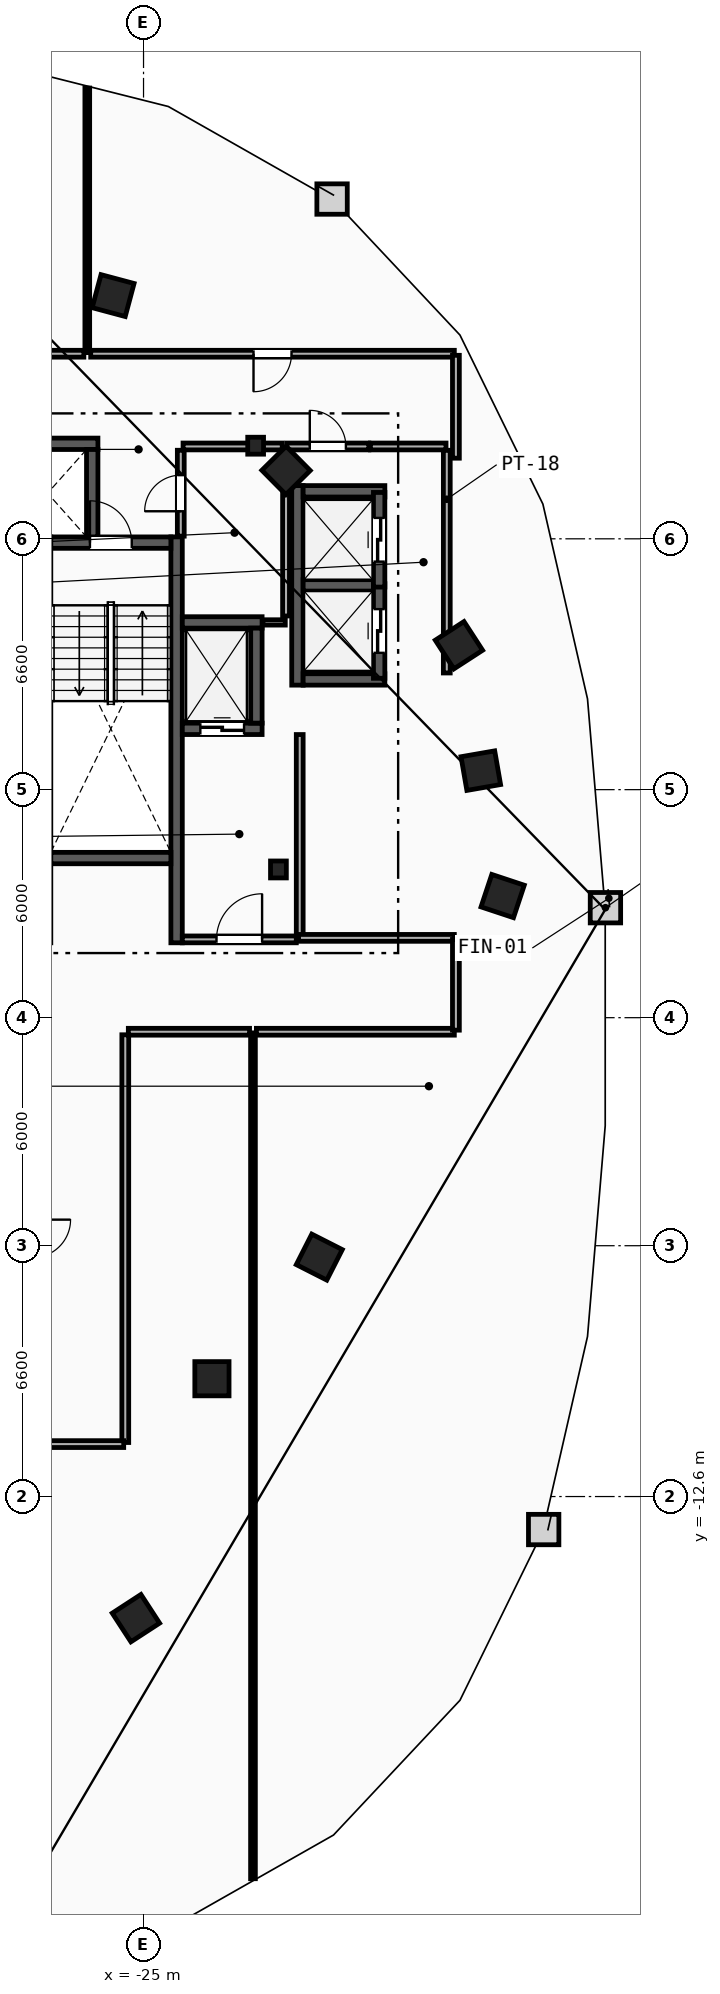
"""IFC4 building model, lengths in metres.
Left out: names, types, materials, properties, quantities, classifications, styles, units other than length and angle.
Written with IfcOpenShell. Run it as: python <this file> out.ifc"""

import sys

from ifc_helpers import new_model, si_unit, direction, frame, frame_2d, origin, origin_2d, place, context, subcontext, project, spatial, rectangle, i_section, extrude, element, fill, save


model = new_model("IFC4")
c1 = context("Model", 3, precision=1e-05, world=origin(), true_north=direction((0.0, 1.0)))
c2 = subcontext(c1, "Body", "Model", "MODEL_VIEW")
j1 = project(units=[si_unit("LENGTHUNIT", "METRE"), si_unit("PLANEANGLEUNIT", "RADIAN")], contexts=[c1])
p1 = place(None, origin())
s1 = spatial("IfcSite", under=j1, at=p1, CompositionType="ELEMENT")
p2 = place(p1, origin())
s2 = spatial("IfcBuilding", under=s1, at=p2, CompositionType="ELEMENT")
p3 = place(p2, frame((0.0, 0.0, 195.4)))
s3 = spatial("IfcBuildingStorey", under=s2, at=p3, CompositionType="ELEMENT", Elevation=195.4)
for number, where, z_axis, x_axis in (
    (1, (-21.45, 3.9, 0.0), (0.0, 0.0, 1.0), (1.0, 0.0, 0.0)),
    (2, (-22.05, 15.05, 0.0), (0.0, 0.0, 1.0), (1.0, 0.0, 0.0)),
):
    element("IfcColumn", number, at=place(p3, frame(where, z_axis=z_axis, x_axis=x_axis)), inside=s3, PredefinedType="COLUMN", context=c2, shape_type="SweptSolid", body=[
        extrude(i_section(OverallWidth=0.416, OverallDepth=0.446, WebThickness=0.039, FlangeThickness=0.063, FilletRadius=0.018, at=origin_2d()), origin(), (0.0, 0.0, 1.0), 3.6),
    ])
for number, where, z_axis, x_axis in (
    (3, (-23.2, -9.5, 0.0), (0.0, 0.0, 1.0), (1.0, 0.0, 0.0)),
    (4, (-15.55, 3.2, 0.0), (0.0, 0.0, 1.0), (0.315, 0.949, 0.0)),
    (5, (-16.125, 6.5, 0.0), (0.0, 0.0, 1.0), (-0.172, 0.985, 0.0)),
    (6, (-16.7, 9.8, 0.0), (0.0, 0.0, 1.0), (-0.544, 0.839, 0.0)),
    (7, (-21.25, 14.4, 0.0), (0.0, 0.0, 1.0), (-0.703, 0.711, 0.0)),
    (8, (-25.8, 19.0, 0.0), (0.0, 0.0, 1.0), (-0.966, 0.259, 0.0)),
    (9, (-25.2, -15.8, 0.0), (0.0, 0.0, 1.0), (0.838, 0.546, 0.0)),
    (10, (-20.375, -6.3, 0.0), (0.0, 0.0, 1.0), (0.453, 0.892, 0.0)),
):
    element("IfcColumn", number, at=place(p3, frame(where, z_axis=z_axis, x_axis=x_axis)), inside=s3, PredefinedType="COLUMN", context=c2, shape_type="SweptSolid", body=[
        extrude(rectangle(XDim=0.9, YDim=0.9, at=origin_2d()), origin(), (0.0, 0.0, 1.0), 3.6),
    ])
p4 = place(p3, frame((-24.13, 1.97, 0.0), z_axis=(0.0, 0.0, 1.0), x_axis=(0.0, 1.0, 0.0)))
e11 = element("IfcWall", 11, at=p4, inside=s3, PredefinedType="SHEAR", context=c2, shape_type="SweptSolid", body=[
    extrude(rectangle(XDim=10.68, YDim=0.3, at=frame_2d((5.34, 0.0))), origin(), (0.0, 0.0, 1.0), 3.34),
])
p5 = place(p3, frame((-27.44, 12.5, 0.0), z_axis=(0.0, 0.0, 1.0), x_axis=(1.0, 0.0, 0.0)))
e12 = element("IfcWall", 12, at=p5, inside=s3, PredefinedType="SHEAR", context=c2, shape_type="SweptSolid", body=[
    extrude(rectangle(XDim=3.16, YDim=0.3, at=frame_2d((1.58, 0.0))), origin(), (0.0, 0.0, 1.0), 3.34),
])
p6 = place(p5, frame((1.03, 0.0, 0.0)))
e13 = element("IfcOpeningElement", 13, at=p6, cuts=e12, PredefinedType="OPENING", context=c2, shape_type="SweptSolid", body=[
    extrude(rectangle(XDim=1.1, YDim=2.15, at=frame_2d((0.55, 1.075))), frame((0.0, 0.16, 0.0), z_axis=(0.0, -1.0, 0.0), x_axis=(1.0, 0.0, 0.0)), (0.0, 0.0, 1.0), 0.32),
])
p7 = place(p3, frame((-27.44, 4.2, 0.0), z_axis=(0.0, 0.0, 1.0), x_axis=(1.0, 0.0, 0.0)))
e14 = element("IfcWall", 14, at=p7, inside=s3, PredefinedType="SHEAR", context=c2, shape_type="SweptSolid", body=[
    extrude(rectangle(XDim=3.16, YDim=0.3, at=frame_2d((1.58, 0.0))), origin(), (0.0, 0.0, 1.0), 3.34),
])
p8 = place(p3, frame((-20.89, 2.15, 0.0), z_axis=(0.0, 0.0, 1.0), x_axis=(0.0, 1.0, 0.0)))
e15 = element("IfcWall", 15, at=p8, inside=s3, PredefinedType="PARTITIONING", context=c2, shape_type="SweptSolid", body=[
    extrude(rectangle(XDim=5.3, YDim=0.18, at=frame_2d((2.65, 0.0))), origin(), (0.0, 0.0, 1.0), 3.34),
])
p9 = place(p3, frame((-23.98, 2.06, 0.0), z_axis=(0.0, 0.0, 1.0), x_axis=(1.0, 0.0, 0.0)))
e16 = element("IfcWall", 16, at=p9, inside=s3, PredefinedType="PARTITIONING", context=c2, shape_type="SweptSolid", body=[
    extrude(rectangle(XDim=3.0, YDim=0.18, at=frame_2d((1.5, 0.0))), origin(), (0.0, 0.0, 1.0), 3.34),
])
p10 = place(p9, frame((0.9, 0.0, 0.0)))
e17 = element("IfcOpeningElement", 17, at=p10, cuts=e16, PredefinedType="OPENING", context=c2, shape_type="SweptSolid", body=[
    extrude(rectangle(XDim=1.2, YDim=2.15, at=frame_2d((0.6, 1.075))), frame((0.0, 0.1, 0.0), z_axis=(0.0, -1.0, 0.0), x_axis=(1.0, 0.0, 0.0)), (0.0, 0.0, 1.0), 0.2),
])
p11 = place(p3, frame((-23.98, 7.6, 0.0), z_axis=(0.0, 0.0, 1.0), x_axis=(1.0, 0.0, 0.0)))
e18 = element("IfcWall", 18, at=p11, inside=s3, PredefinedType="SHEAR", context=c2, shape_type="SweptSolid", body=[
    extrude(rectangle(XDim=2.1, YDim=0.3, at=frame_2d((1.05, 0.0))), origin(), (0.0, 0.0, 1.0), 3.34),
])
p12 = place(p11, frame((0.475, 0.0, 0.0)))
e19 = element("IfcOpeningElement", 19, at=p12, cuts=e18, PredefinedType="OPENING", context=c2, shape_type="SweptSolid", body=[
    extrude(rectangle(XDim=1.15, YDim=2.2, at=frame_2d((0.575, 1.1))), frame((0.0, 0.16, 0.0), z_axis=(0.0, -1.0, 0.0), x_axis=(1.0, 0.0, 0.0)), (0.0, 0.0, 1.0), 0.32),
])
p13 = place(p3, frame((-23.98, 10.4, 0.0), z_axis=(0.0, 0.0, 1.0), x_axis=(1.0, 0.0, 0.0)))
e20 = element("IfcWall", 20, at=p13, inside=s3, PredefinedType="SHEAR", context=c2, shape_type="SweptSolid", body=[
    extrude(rectangle(XDim=2.1, YDim=0.3, at=frame_2d((1.05, 0.0))), origin(), (0.0, 0.0, 1.0), 3.34),
])
for number, where, z_axis, x_axis in (
    (21, (-22.03, 7.75, 0.0), (0.0, 0.0, 1.0), (0.0, 1.0, 0.0)),
    (22, (-28.7, 15.1, 0.0), (0.0, 0.0, 1.0), (1.0, 0.0, 0.0)),
):
    element("IfcWall", number, at=place(p3, frame(where, z_axis=z_axis, x_axis=x_axis)), inside=s3, PredefinedType="SHEAR", context=c2, shape_type="SweptSolid", body=[
        extrude(rectangle(XDim=2.5, YDim=0.3, at=frame_2d((1.25, 0.0))), origin(), (0.0, 0.0, 1.0), 3.34),
    ])
p14 = place(p3, frame((-26.35, 12.65, 0.0), z_axis=(0.0, 0.0, 1.0), x_axis=(0.0, 1.0, 0.0)))
e23 = element("IfcWall", 23, at=p14, inside=s3, PredefinedType="SHEAR", context=c2, shape_type="SweptSolid", body=[
    extrude(rectangle(XDim=2.3, YDim=0.3, at=frame_2d((1.15, 0.0))), origin(), (0.0, 0.0, 1.0), 3.34),
])
p15 = place(p3, frame((-20.95, 8.75, 0.0), z_axis=(0.0, 0.0, 1.0), x_axis=(0.0, 1.0, 0.0)))
e24 = element("IfcWall", 24, at=p15, inside=s3, PredefinedType="SHEAR", context=c2, shape_type="SweptSolid", body=[
    extrude(rectangle(XDim=5.25, YDim=0.3, at=frame_2d((2.625, 0.0))), origin(), (0.0, 0.0, 1.0), 3.34),
])
for number, where, z_axis, x_axis in (
    (25, (-20.8, 8.9, 0.0), (0.0, 0.0, 1.0), (1.0, 0.0, 0.0)),
    (26, (-20.8, 13.85, 0.0), (0.0, 0.0, 1.0), (1.0, 0.0, 0.0)),
):
    element("IfcWall", number, at=place(p3, frame(where, z_axis=z_axis, x_axis=x_axis)), inside=s3, PredefinedType="SHEAR", context=c2, shape_type="SweptSolid", body=[
        extrude(rectangle(XDim=2.15, YDim=0.3, at=frame_2d((1.075, 0.0))), origin(), (0.0, 0.0, 1.0), 3.34),
    ])
p16 = place(p3, frame((-20.8, 11.375, 0.0), z_axis=(0.0, 0.0, 1.0), x_axis=(1.0, 0.0, 0.0)))
e27 = element("IfcWall", 27, at=p16, inside=s3, PredefinedType="SHEAR", context=c2, shape_type="SweptSolid", body=[
    extrude(rectangle(XDim=1.85, YDim=0.3, at=frame_2d((0.925, 0.0))), origin(), (0.0, 0.0, 1.0), 3.34),
])
p17 = place(p3, frame((-18.8, 8.93, 0.0), z_axis=(0.0, 0.0, 1.0), x_axis=(0.0, 1.0, 0.0)))
e28 = element("IfcWall", 28, at=p17, inside=s3, PredefinedType="SHEAR", context=c2, shape_type="SweptSolid", body=[
    extrude(rectangle(XDim=2.49, YDim=0.3, at=frame_2d((1.245, 0.0))), origin(), (0.0, 0.0, 1.0), 3.34),
])
p18 = place(p17, frame((0.67, 0.0, 0.0)))
e29 = element("IfcOpeningElement", 29, at=p18, cuts=e28, PredefinedType="OPENING", context=c2, shape_type="SweptSolid", body=[
    extrude(rectangle(XDim=1.15, YDim=2.2, at=frame_2d((0.575, 1.1))), frame((0.0, 0.16, 0.0), z_axis=(0.0, -1.0, 0.0), x_axis=(1.0, 0.0, 0.0)), (0.0, 0.0, 1.0), 0.32),
])
p19 = place(p3, frame((-18.8, 11.33, 0.0), z_axis=(0.0, 0.0, 1.0), x_axis=(0.0, 1.0, 0.0)))
e30 = element("IfcWall", 30, at=p19, inside=s3, PredefinedType="SHEAR", context=c2, shape_type="SweptSolid", body=[
    extrude(rectangle(XDim=2.49, YDim=0.3, at=frame_2d((1.245, 0.0))), origin(), (0.0, 0.0, 1.0), 3.34),
])
p20 = place(p19, frame((0.67, 0.0, 0.0)))
e31 = element("IfcOpeningElement", 31, at=p20, cuts=e30, PredefinedType="OPENING", context=c2, shape_type="SweptSolid", body=[
    extrude(rectangle(XDim=1.15, YDim=2.2, at=frame_2d((0.575, 1.1))), frame((0.0, 0.16, 0.0), z_axis=(0.0, -1.0, 0.0), x_axis=(1.0, 0.0, 0.0)), (0.0, 0.0, 1.0), 0.32),
])
p21 = place(p3, frame((-17.02, 9.07, 0.0), z_axis=(0.0, 0.0, 1.0), x_axis=(0.0, 1.0, 0.0)))
e32 = element("IfcWall", 32, at=p21, inside=s3, PredefinedType="PARTITIONING", context=c2, shape_type="SweptSolid", body=[
    extrude(rectangle(XDim=5.86, YDim=0.18, at=frame_2d((2.93, 0.0))), origin(), (0.0, 0.0, 1.0), 3.34),
])
p22 = place(p3, frame((-21.23, 15.03, 0.0), z_axis=(0.0, 0.0, 1.0), x_axis=(1.0, 0.0, 0.0)))
e33 = element("IfcWall", 33, at=p22, inside=s3, PredefinedType="PARTITIONING", context=c2, shape_type="SweptSolid", body=[
    extrude(rectangle(XDim=2.16, YDim=0.18, at=frame_2d((1.08, 0.0))), origin(), (0.0, 0.0, 1.0), 3.34),
])
p23 = place(p22, frame((0.605, 0.0, 0.0)))
e34 = element("IfcOpeningElement", 34, at=p23, cuts=e33, PredefinedType="OPENING", context=c2, shape_type="SweptSolid", body=[
    extrude(rectangle(XDim=0.95, YDim=2.1, at=frame_2d((0.475, 1.05))), frame((0.0, 0.1, 0.0), z_axis=(0.0, -1.0, 0.0), x_axis=(1.0, 0.0, 0.0)), (0.0, 0.0, 1.0), 0.2),
])
p24 = place(p3, frame((-19.03, 15.03, 0.0), z_axis=(0.0, 0.0, 1.0), x_axis=(1.0, 0.0, 0.0)))
e35 = element("IfcWall", 35, at=p24, inside=s3, PredefinedType="PARTITIONING", context=c2, shape_type="SweptSolid", body=[
    extrude(rectangle(XDim=1.99, YDim=0.18, at=frame_2d((0.995, 0.0))), origin(), (0.0, 0.0, 1.0), 3.34),
])
p25 = place(p3, frame((-21.86, 10.4, 0.0), z_axis=(0.0, 0.0, 1.0), x_axis=(1.0, 0.0, 0.0)))
e36 = element("IfcWall", 36, at=p25, inside=s3, PredefinedType="PARTITIONING", context=c2, shape_type="SweptSolid", body=[
    extrude(rectangle(XDim=0.59, YDim=0.14, at=frame_2d((0.295, 0.0))), origin(), (0.0, 0.0, 1.0), 3.34),
])
p26 = place(p3, frame((-21.25, 10.57, 0.0), z_axis=(0.0, 0.0, 1.0), x_axis=(0.0, 1.0, 0.0)))
e37 = element("IfcWall", 37, at=p26, inside=s3, PredefinedType="PARTITIONING", context=c2, shape_type="SweptSolid", body=[
    extrude(rectangle(XDim=4.36, YDim=0.18, at=frame_2d((2.18, 0.0))), origin(), (0.0, 0.0, 1.0), 3.34),
])
p27 = place(p3, frame((-23.96, 15.03, 0.0), z_axis=(0.0, 0.0, 1.0), x_axis=(1.0, 0.0, 0.0)))
e38 = element("IfcWall", 38, at=p27, inside=s3, PredefinedType="PARTITIONING", context=c2, shape_type="SweptSolid", body=[
    extrude(rectangle(XDim=2.61, YDim=0.18, at=frame_2d((1.305, 0.0))), origin(), (0.0, 0.0, 1.0), 2.413),
])
p28 = place(p3, frame((-24.02, 12.67, 0.0), z_axis=(0.0, 0.0, 1.0), x_axis=(0.0, 1.0, 0.0)))
e39 = element("IfcWall", 39, at=p28, inside=s3, PredefinedType="PARTITIONING", context=c2, shape_type="SweptSolid", body=[
    extrude(rectangle(XDim=2.26, YDim=0.18, at=frame_2d((1.13, 0.0))), origin(), (0.0, 0.0, 1.0), 3.34),
])
p29 = place(p28, frame((0.655, 0.0, 0.0)))
e40 = element("IfcOpeningElement", 40, at=p29, cuts=e39, PredefinedType="OPENING", context=c2, shape_type="SweptSolid", body=[
    extrude(rectangle(XDim=0.95, YDim=2.1, at=frame_2d((0.475, 1.05))), frame((0.0, 0.1, 0.0), z_axis=(0.0, -1.0, 0.0), x_axis=(1.0, 0.0, 0.0)), (0.0, 0.0, 1.0), 0.2),
])
p30 = place(p3, frame((-22.12, -22.656, 0.0), z_axis=(0.0, 0.0, 1.0), x_axis=(0.0, 1.0, 0.0)))
e41 = element("IfcWall", 41, at=p30, inside=s3, PredefinedType="PARTITIONING", context=c2, shape_type="SweptSolid", body=[
    extrude(rectangle(XDim=22.256, YDim=0.125, at=frame_2d((11.128, 0.0))), origin(), (0.0, 0.0, 1.0), 2.724),
])
p31 = place(p3, frame((-26.48, 17.5, 0.0), z_axis=(0.0, 0.0, 1.0), x_axis=(0.0, 1.0, 0.0)))
e42 = element("IfcWall", 42, at=p31, inside=s3, PredefinedType="PARTITIONING", context=c2, shape_type="SweptSolid", body=[
    extrude(rectangle(XDim=6.961, YDim=0.125, at=frame_2d((3.48, 0.0))), origin(), (0.0, 0.0, 1.0), 3.34),
])
p32 = place(p3, frame((-25.48, -11.178, 0.0), z_axis=(0.0, 0.0, 1.0), x_axis=(0.0, 1.0, 0.0)))
e43 = element("IfcWall", 43, at=p32, inside=s3, PredefinedType="PARTITIONING", context=c2, shape_type="SweptSolid", body=[
    extrude(rectangle(XDim=10.729, YDim=0.18, at=frame_2d((5.364, 0.0))), origin(), (0.0, 0.0, 1.0), 3.34),
])
p33 = place(p3, frame((-25.4, -0.37, 0.0), z_axis=(0.0, 0.0, 1.0), x_axis=(1.0, 0.0, 0.0)))
e44 = element("IfcWall", 44, at=p33, inside=s3, PredefinedType="PARTITIONING", context=c2, shape_type="SweptSolid", body=[
    extrude(rectangle(XDim=3.19, YDim=0.18, at=frame_2d((1.595, 0.0))), origin(), (0.0, 0.0, 1.0), 3.34),
])
p34 = place(p3, frame((-27.878, -11.22, 0.0), z_axis=(0.0, 0.0, 1.0), x_axis=(1.0, 0.0, 0.0)))
e45 = element("IfcWall", 45, at=p34, inside=s3, PredefinedType="PARTITIONING", context=c2, shape_type="SweptSolid", body=[
    extrude(rectangle(XDim=2.357, YDim=0.18, at=frame_2d((1.178, 0.0))), origin(), (0.0, 0.0, 1.0), 3.34),
])
p35 = place(p3, frame((-16.822, 17.47, 0.0), z_axis=(0.0, 0.0, 1.0), x_axis=(-1.0, 0.0, 0.0)))
e46 = element("IfcWall", 46, at=p35, inside=s3, PredefinedType="PARTITIONING", context=c2, shape_type="SweptSolid", body=[
    extrude(rectangle(XDim=9.568, YDim=0.18, at=frame_2d((4.784, 0.0))), origin(), (0.0, 0.0, 1.0), 3.34),
])
p36 = place(p35, frame((4.284, 0.0, 0.0)))
e47 = element("IfcOpeningElement", 47, at=p36, cuts=e46, PredefinedType="OPENING", context=c2, shape_type="SweptSolid", body=[
    extrude(rectangle(XDim=1.0, YDim=2.15, at=frame_2d((0.5, 1.075))), frame((0.0, 0.1, 0.0), z_axis=(0.0, -1.0, 0.0), x_axis=(1.0, 0.0, 0.0)), (0.0, 0.0, 1.0), 0.2),
])
p37 = place(p3, frame((-22.03, -0.37, 0.0), z_axis=(0.0, 0.0, 1.0), x_axis=(1.0, 0.0, 0.0)))
e48 = element("IfcWall", 48, at=p37, inside=s3, PredefinedType="PARTITIONING", context=c2, shape_type="SweptSolid", body=[
    extrude(rectangle(XDim=5.208, YDim=0.18, at=frame_2d((2.604, 0.0))), origin(), (0.0, 0.0, 1.0), 3.34),
])
p38 = place(p3, frame((-16.822, 2.1, 0.0), z_axis=(0.0, 0.0, 1.0), x_axis=(-1.0, 0.0, 0.0)))
e49 = element("IfcWall", 49, at=p38, inside=s3, PredefinedType="PARTITIONING", context=c2, shape_type="SweptSolid", body=[
    extrude(rectangle(XDim=4.098, YDim=0.18, at=frame_2d((2.049, 0.0))), origin(), (0.0, 0.0, 1.0), 3.34),
])
p39 = place(p3, frame((-16.78, 14.721, 0.0), z_axis=(0.0, 0.0, 1.0), x_axis=(0.0, 1.0, 0.0)))
e50 = element("IfcWall", 50, at=p39, inside=s3, PredefinedType="PARTITIONING", context=c2, shape_type="SweptSolid", body=[
    extrude(rectangle(XDim=2.707, YDim=0.18, at=frame_2d((1.354, 0.0))), origin(), (0.0, 0.0, 1.0), 3.34),
])
p40 = place(p3, frame((-16.78, -0.329, 0.0), z_axis=(0.0, 0.0, 1.0), x_axis=(0.0, 1.0, 0.0)))
e51 = element("IfcWall", 51, at=p40, inside=s3, PredefinedType="PARTITIONING", context=c2, shape_type="SweptSolid", body=[
    extrude(rectangle(XDim=2.387, YDim=0.18, at=frame_2d((1.194, 0.0))), origin(), (0.0, 0.0, 1.0), 3.34),
])
p41 = place(p3, frame((-26.57, 17.47, 0.0), z_axis=(0.0, 0.0, 1.0), x_axis=(-1.0, 0.0, 0.0)))
e52 = element("IfcWall", 52, at=p41, inside=s3, PredefinedType="PARTITIONING", context=c2, shape_type="SweptSolid", body=[
    extrude(rectangle(XDim=5.42, YDim=0.18, at=frame_2d((2.71, 0.0))), origin(), (0.0, 0.0, 1.0), 3.34),
])
p42 = place(p41, frame((1.91, 0.0, 0.0)))
e53 = element("IfcOpeningElement", 53, at=p42, cuts=e52, PredefinedType="OPENING", context=c2, shape_type="SweptSolid", body=[
    extrude(rectangle(XDim=1.6, YDim=2.2, at=frame_2d((0.8, 1.1))), frame((0.0, 0.1, 0.0), z_axis=(0.0, -1.0, 0.0), x_axis=(1.0, 0.0, 0.0)), (0.0, 0.0, 1.0), 0.2),
])
p43 = place(p6, origin())
e54 = element("IfcDoor", 54, at=p43, inside=s3, OperationType="SINGLE_SWING_LEFT", PredefinedType="DOOR", context=c2, shape_type="SweptSolid", body=[
    extrude(rectangle(XDim=1.1, YDim=2.15, at=frame_2d((0.55, 1.075))), frame((0.0, 0.025, 0.0), z_axis=(0.0, -1.0, 0.0), x_axis=(1.0, 0.0, 0.0)), (0.0, 0.0, 1.0), 0.05),
])
fill(e13, e54)
p44 = place(p10, origin())
e55 = element("IfcDoor", 55, at=p44, inside=s3, OperationType="SINGLE_SWING_RIGHT", PredefinedType="DOOR", context=c2, shape_type="SweptSolid", body=[
    extrude(rectangle(XDim=1.2, YDim=2.15, at=frame_2d((0.6, 1.075))), frame((0.0, 0.025, 0.0), z_axis=(0.0, -1.0, 0.0), x_axis=(1.0, 0.0, 0.0)), (0.0, 0.0, 1.0), 0.05),
])
fill(e17, e55)
p45 = place(p12, origin())
e56 = element("IfcDoor", 56, at=p45, inside=s3, OperationType="SLIDING_TO_LEFT", PredefinedType="TRAPDOOR", context=c2, shape_type="SweptSolid", body=[
    extrude(rectangle(XDim=1.15, YDim=2.2, at=frame_2d((0.575, 1.1))), frame((0.0, 0.025, 0.0), z_axis=(0.0, -1.0, 0.0), x_axis=(1.0, 0.0, 0.0)), (0.0, 0.0, 1.0), 0.05),
])
fill(e19, e56)
p46 = place(p18, origin())
e57 = element("IfcDoor", 57, at=p46, inside=s3, OperationType="SLIDING_TO_LEFT", PredefinedType="TRAPDOOR", context=c2, shape_type="SweptSolid", body=[
    extrude(rectangle(XDim=1.15, YDim=2.2, at=frame_2d((0.575, 1.1))), frame((0.0, 0.025, 0.0), z_axis=(0.0, -1.0, 0.0), x_axis=(1.0, 0.0, 0.0)), (0.0, 0.0, 1.0), 0.05),
])
fill(e29, e57)
p47 = place(p20, origin())
e58 = element("IfcDoor", 58, at=p47, inside=s3, OperationType="SLIDING_TO_LEFT", PredefinedType="TRAPDOOR", context=c2, shape_type="SweptSolid", body=[
    extrude(rectangle(XDim=1.15, YDim=2.2, at=frame_2d((0.575, 1.1))), frame((0.0, 0.025, 0.0), z_axis=(0.0, -1.0, 0.0), x_axis=(1.0, 0.0, 0.0)), (0.0, 0.0, 1.0), 0.05),
])
fill(e31, e58)
p48 = place(p36, origin())
e59 = element("IfcDoor", 59, at=p48, inside=s3, OperationType="SINGLE_SWING_RIGHT", PredefinedType="DOOR", context=c2, shape_type="SweptSolid", body=[
    extrude(rectangle(XDim=1.0, YDim=2.15, at=frame_2d((0.5, 1.075))), frame((0.0, 0.025, 0.0), z_axis=(0.0, -1.0, 0.0), x_axis=(1.0, 0.0, 0.0)), (0.0, 0.0, 1.0), 0.05),
])
fill(e47, e59)
p49 = place(p29, origin())
e60 = element("IfcDoor", 60, at=p49, inside=s3, OperationType="SINGLE_SWING_LEFT", PredefinedType="DOOR", context=c2, shape_type="SweptSolid", body=[
    extrude(rectangle(XDim=0.95, YDim=2.1, at=frame_2d((0.475, 1.05))), frame((0.0, 0.025, 0.0), z_axis=(0.0, -1.0, 0.0), x_axis=(1.0, 0.0, 0.0)), (0.0, 0.0, 1.0), 0.05),
])
fill(e40, e60)
p50 = place(p23, origin())
e61 = element("IfcDoor", 61, at=p50, inside=s3, OperationType="SINGLE_SWING_LEFT", PredefinedType="DOOR", context=c2, shape_type="SweptSolid", body=[
    extrude(rectangle(XDim=0.95, YDim=2.1, at=frame_2d((0.475, 1.05))), frame((0.0, 0.025, 0.0), z_axis=(0.0, -1.0, 0.0), x_axis=(1.0, 0.0, 0.0)), (0.0, 0.0, 1.0), 0.05),
])
fill(e34, e61)
save(model, sys.argv[1])
